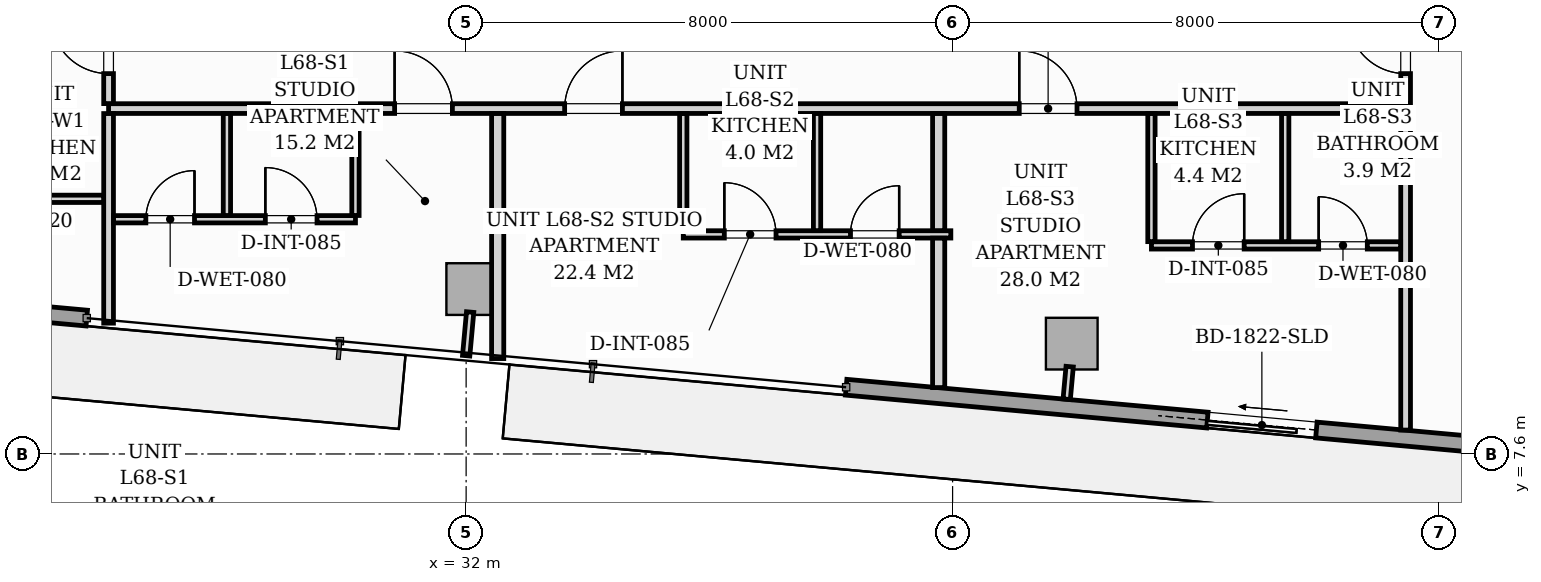
"""IFC4 building model, lengths in metres.
Left out: names, types, materials, properties, quantities, classifications, styles, units other than length and angle.
Written with IfcOpenShell. Run it as: python <this file> out.ifc"""

import sys

from ifc_helpers import new_model, si_unit, direction, frame, frame_2d, origin, origin_2d, place, context, subcontext, project, spatial, rectangle, extrude, source, transform, mapped, element, fill, save


model = new_model("IFC4")
c1 = context("Model", 3, precision=1e-05, world=origin(), true_north=direction((0.0, 1.0)))
c2 = subcontext(c1, "Body", "Model", "MODEL_VIEW")
j1 = project(units=[si_unit("LENGTHUNIT", "METRE"), si_unit("PLANEANGLEUNIT", "RADIAN")], contexts=[c1])
p1 = place(None, origin())
s1 = spatial("IfcSite", under=j1, at=p1, CompositionType="ELEMENT")
p2 = place(p1, origin())
s2 = spatial("IfcBuilding", under=s1, at=p2, CompositionType="ELEMENT")
p3 = place(p2, frame((0.0, 0.0, 236.4)))
s3 = spatial("IfcBuildingStorey", under=s2, at=p3, CompositionType="ELEMENT", Elevation=236.4)
m1 = source(origin(), c2, "Body", "SweptSolid", [
    extrude(rectangle(XDim=0.85, YDim=0.85, at=origin_2d()), origin(), (0.0, 0.0, 1.0), 3.296),
])
for number, where, z_axis, x_axis in (
    (1, (32.1, 10.312, 0.002), (0.0, 0.0, 1.0), (0.996, -0.091, 0.0)),
    (2, (41.96, 9.415, 0.002), (0.0, 0.0, 1.0), (0.996, -0.091, 0.0)),
):
    element("IfcColumn", number, at=place(p3, frame(where, z_axis=z_axis, x_axis=x_axis)), inside=s3, PredefinedType="COLUMN", context=c2, shape_type="MappedRepresentation", body=[
        mapped(m1, transform((0.0, 0.0, 0.0), scale=1.0)),
    ])
p4 = place(p3, frame((52.819, 7.372, 0.0), z_axis=(0.0, 0.0, 1.0), x_axis=(-0.995884447498, 0.090632043071, 0.0)))
e3 = element("IfcWall", 3, at=p4, inside=s3, PredefinedType="STANDARD", context=c2, shape_type="SweptSolid", body=[
    extrude(rectangle(XDim=14.63, YDim=0.26, at=frame_2d((7.315, 0.0))), origin(), (0.0, 0.0, 1.0), 3.04),
])
p5 = place(p4, frame((6.865, 0.0, 0.0)))
e4 = element("IfcOpeningElement", 4, at=p5, cuts=e3, PredefinedType="OPENING", context=c2, shape_type="SweptSolid", body=[
    extrude(rectangle(XDim=1.8, YDim=2.06, at=frame_2d((0.9, 1.03))), frame((0.0, 0.14, 0.0), z_axis=(0.0, -1.0, 0.0), x_axis=(1.0, 0.0, 0.0)), (0.0, 0.0, 1.0), 0.28),
])
p6 = place(p4, frame((2.05, 0.0, 0.65)))
e5 = element("IfcOpeningElement", 5, at=p6, cuts=e3, PredefinedType="OPENING", context=c2, shape_type="SweptSolid", body=[
    extrude(rectangle(XDim=1.6, YDim=1.5, at=frame_2d((0.8, 0.75))), frame((0.0, 0.14, 0.0), z_axis=(0.0, -1.0, 0.0), x_axis=(1.0, 0.0, 0.0)), (0.0, 0.0, 1.0), 0.28),
])
p7 = place(p3, frame((25.761, 9.834, 0.0), z_axis=(0.0, 0.0, 1.0), x_axis=(-0.995884584572, 0.090630536861, 0.0)))
e6 = element("IfcWall", 6, at=p7, inside=s3, PredefinedType="STANDARD", context=c2, shape_type="SweptSolid", body=[
    extrude(rectangle(XDim=14.63, YDim=0.26, at=frame_2d((7.315, 0.0))), origin(), (0.0, 0.0, 1.0), 3.04),
])
p8 = place(p7, frame((4.97, 0.0, 0.0)))
e7 = element("IfcOpeningElement", 7, at=p8, cuts=e6, PredefinedType="OPENING", context=c2, shape_type="SweptSolid", body=[
    extrude(rectangle(XDim=1.8, YDim=2.06, at=frame_2d((0.9, 1.03))), frame((0.0, 0.14, 0.0), z_axis=(0.0, -1.0, 0.0), x_axis=(1.0, 0.0, 0.0)), (0.0, 0.0, 1.0), 0.28),
])
p9 = place(p7, frame((0.7, 0.0, 0.65)))
e8 = element("IfcOpeningElement", 8, at=p9, cuts=e6, PredefinedType="OPENING", context=c2, shape_type="SweptSolid", body=[
    extrude(rectangle(XDim=1.6, YDim=1.5, at=frame_2d((0.8, 0.75))), frame((0.0, 0.14, 0.0), z_axis=(0.0, -1.0, 0.0), x_axis=(1.0, 0.0, 0.0)), (0.0, 0.0, 1.0), 0.28),
])
p10 = place(p3, frame((26.12, 13.28, 0.0), z_axis=(0.0, 0.0, 1.0), x_axis=(1.0, 0.0, 0.0)))
e9 = element("IfcWall", 9, at=p10, inside=s3, PredefinedType="PARTITIONING", context=c2, shape_type="SweptSolid", body=[
    extrude(rectangle(XDim=21.33, YDim=0.16, at=frame_2d((10.665, 0.0))), origin(), (0.0, 0.0, 1.0), 2.597),
])
p11 = place(p10, frame((4.704, 0.0, 0.0)))
e10 = element("IfcOpeningElement", 10, at=p11, cuts=e9, PredefinedType="OPENING", context=c2, shape_type="SweptSolid", body=[
    extrude(rectangle(XDim=0.95, YDim=2.06, at=frame_2d((0.475, 1.03))), frame((0.0, 0.09, 0.0), z_axis=(0.0, -1.0, 0.0), x_axis=(1.0, 0.0, 0.0)), (0.0, 0.0, 1.0), 0.18),
])
p12 = place(p10, frame((7.5, 0.0, 0.0)))
e11 = element("IfcOpeningElement", 11, at=p12, cuts=e9, PredefinedType="OPENING", context=c2, shape_type="SweptSolid", body=[
    extrude(rectangle(XDim=0.95, YDim=2.06, at=frame_2d((0.475, 1.03))), frame((0.0, 0.09, 0.0), z_axis=(0.0, -1.0, 0.0), x_axis=(1.0, 0.0, 0.0)), (0.0, 0.0, 1.0), 0.18),
])
p13 = place(p10, frame((14.976, 0.0, 0.0)))
e12 = element("IfcOpeningElement", 12, at=p13, cuts=e9, PredefinedType="OPENING", context=c2, shape_type="SweptSolid", body=[
    extrude(rectangle(XDim=0.95, YDim=2.06, at=frame_2d((0.475, 1.03))), frame((0.0, 0.09, 0.0), z_axis=(0.0, -1.0, 0.0), x_axis=(1.0, 0.0, 0.0)), (0.0, 0.0, 1.0), 0.18),
])
p14 = place(p3, frame((26.12, 9.751, 0.0), z_axis=(0.0, 0.0, 1.0), x_axis=(0.0, 1.0, 0.0)))
e13 = element("IfcWall", 13, at=p14, inside=s3, PredefinedType="PARTITIONING", context=c2, shape_type="SweptSolid", body=[
    extrude(rectangle(XDim=3.447, YDim=0.16, at=frame_2d((1.723, 0.0))), origin(), (0.0, 0.0, 1.0), 3.04),
])
p15 = place(p3, frame((26.12, 13.362, 0.0), z_axis=(0.0, 0.0, 1.0), x_axis=(0.0, 1.0, 0.0)))
e14 = element("IfcWall", 14, at=p15, inside=s3, PredefinedType="PARTITIONING", context=c2, shape_type="SweptSolid", body=[
    extrude(rectangle(XDim=4.44, YDim=0.16, at=frame_2d((2.22, 0.0))), origin(), (0.0, 0.0, 1.0), 3.04),
])
p16 = place(p15, frame((0.493, 0.0, 0.0)))
e15 = element("IfcOpeningElement", 15, at=p16, cuts=e14, PredefinedType="OPENING", context=c2, shape_type="SweptSolid", body=[
    extrude(rectangle(XDim=0.95, YDim=2.06, at=frame_2d((0.475, 1.03))), frame((0.0, 0.09, 0.0), z_axis=(0.0, -1.0, 0.0), x_axis=(1.0, 0.0, 0.0)), (0.0, 0.0, 1.0), 0.18),
])
p17 = place(p3, frame((47.45, 7.993, 0.0), z_axis=(0.0, 0.0, 1.0), x_axis=(0.0, 1.0, 0.0)))
e16 = element("IfcWall", 16, at=p17, inside=s3, PredefinedType="PARTITIONING", context=c2, shape_type="SweptSolid", body=[
    extrude(rectangle(XDim=5.205, YDim=0.16, at=frame_2d((2.603, 0.0))), origin(), (0.0, 0.0, 1.0), 3.04),
])
p18 = place(p3, frame((47.45, 13.362, 0.0), z_axis=(0.0, 0.0, 1.0), x_axis=(0.0, 1.0, 0.0)))
e17 = element("IfcWall", 17, at=p18, inside=s3, PredefinedType="PARTITIONING", context=c2, shape_type="SweptSolid", body=[
    extrude(rectangle(XDim=7.288, YDim=0.16, at=frame_2d((3.644, 0.0))), origin(), (0.0, 0.0, 1.0), 3.04),
])
p19 = place(p18, frame((0.493, 0.0, 0.0)))
e18 = element("IfcOpeningElement", 18, at=p19, cuts=e17, PredefinedType="OPENING", context=c2, shape_type="SweptSolid", body=[
    extrude(rectangle(XDim=0.95, YDim=2.06, at=frame_2d((0.475, 1.03))), frame((0.0, 0.09, 0.0), z_axis=(0.0, -1.0, 0.0), x_axis=(1.0, 0.0, 0.0)), (0.0, 0.0, 1.0), 0.18),
])
p20 = place(p18, frame((4.783, 0.0, 0.0)))
e19 = element("IfcOpeningElement", 19, at=p20, cuts=e17, PredefinedType="OPENING", context=c2, shape_type="SweptSolid", body=[
    extrude(rectangle(XDim=0.95, YDim=2.06, at=frame_2d((0.475, 1.03))), frame((0.0, 0.09, 0.0), z_axis=(0.0, -1.0, 0.0), x_axis=(1.0, 0.0, 0.0)), (0.0, 0.0, 1.0), 0.18),
])
p21 = place(p3, frame((26.202, 11.46, 0.0), z_axis=(0.0, 0.0, 1.0), x_axis=(1.0, 0.0, 0.0)))
e20 = element("IfcWall", 20, at=p21, inside=s3, PredefinedType="PARTITIONING", context=c2, shape_type="SweptSolid", body=[
    extrude(rectangle(XDim=3.978, YDim=0.12, at=frame_2d((1.989, 0.0))), origin(), (0.0, 0.0, 1.0), 2.597),
])
p22 = place(p21, frame((0.531, 0.0, 0.0)))
e21 = element("IfcOpeningElement", 21, at=p22, cuts=e20, PredefinedType="OPENING", context=c2, shape_type="SweptSolid", body=[
    extrude(rectangle(XDim=0.8, YDim=2.02, at=frame_2d((0.4, 1.01))), frame((0.0, 0.07, 0.0), z_axis=(0.0, -1.0, 0.0), x_axis=(1.0, 0.0, 0.0)), (0.0, 0.0, 1.0), 0.14),
])
p23 = place(p21, frame((2.496, 0.0, 0.0)))
e22 = element("IfcOpeningElement", 22, at=p23, cuts=e20, PredefinedType="OPENING", context=c2, shape_type="SweptSolid", body=[
    extrude(rectangle(XDim=0.85, YDim=2.05, at=frame_2d((0.425, 1.025))), frame((0.0, 0.07, 0.0), z_axis=(0.0, -1.0, 0.0), x_axis=(1.0, 0.0, 0.0)), (0.0, 0.0, 1.0), 0.14),
])
for number, where, z_axis, x_axis in (
    (23, (30.18, 11.522, 0.0), (0.0, 0.0, 1.0), (0.0, 1.0, 0.0)),
    (24, (28.066, 11.522, 0.0), (0.0, 0.0, 1.0), (0.0, 1.0, 0.0)),
):
    element("IfcWall", number, at=place(p3, frame(where, z_axis=z_axis, x_axis=x_axis)), inside=s3, PredefinedType="PARTITIONING", context=c2, shape_type="SweptSolid", body=[
        extrude(rectangle(XDim=1.676, YDim=0.12, at=frame_2d((0.838, 0.0))), origin(), (0.0, 0.0, 1.0), 3.04),
    ])
p24 = place(p3, frame((32.519, 9.169, 0.0), z_axis=(0.0, 0.0, 1.0), x_axis=(0.0, 1.0, 0.0)))
e25 = element("IfcWall", 25, at=p24, inside=s3, PredefinedType="PARTITIONING", context=c2, shape_type="SweptSolid", body=[
    extrude(rectangle(XDim=4.029, YDim=0.2, at=frame_2d((2.014, 0.0))), origin(), (0.0, 0.0, 1.0), 2.4),
])
p25 = place(p3, frame((35.571, 11.211, 0.0), z_axis=(0.0, 0.0, 1.0), x_axis=(1.0, 0.0, 0.0)))
e26 = element("IfcWall", 26, at=p25, inside=s3, PredefinedType="PARTITIONING", context=c2, shape_type="SweptSolid", body=[
    extrude(rectangle(XDim=4.4, YDim=0.12, at=frame_2d((2.2, 0.0))), origin(), (0.0, 0.0, 1.0), 3.04),
])
p26 = place(p25, frame((0.675, 0.0, 0.0)))
e27 = element("IfcOpeningElement", 27, at=p26, cuts=e26, PredefinedType="OPENING", context=c2, shape_type="SweptSolid", body=[
    extrude(rectangle(XDim=0.85, YDim=2.05, at=frame_2d((0.425, 1.025))), frame((0.0, 0.07, 0.0), z_axis=(0.0, -1.0, 0.0), x_axis=(1.0, 0.0, 0.0)), (0.0, 0.0, 1.0), 0.14),
])
p27 = place(p25, frame((2.75, 0.0, 0.0)))
e28 = element("IfcOpeningElement", 28, at=p27, cuts=e26, PredefinedType="OPENING", context=c2, shape_type="SweptSolid", body=[
    extrude(rectangle(XDim=0.8, YDim=2.02, at=frame_2d((0.4, 1.01))), frame((0.0, 0.07, 0.0), z_axis=(0.0, -1.0, 0.0), x_axis=(1.0, 0.0, 0.0)), (0.0, 0.0, 1.0), 0.14),
])
for number, where, z_axis, x_axis in (
    (29, (35.571, 11.273, 0.0), (0.0, 0.0, 1.0), (0.0, 1.0, 0.0)),
    (30, (37.771, 11.273, 0.0), (0.0, 0.0, 1.0), (0.0, 1.0, 0.0)),
):
    element("IfcWall", number, at=place(p3, frame(where, z_axis=z_axis, x_axis=x_axis)), inside=s3, PredefinedType="PARTITIONING", context=c2, shape_type="SweptSolid", body=[
        extrude(rectangle(XDim=1.925, YDim=0.12, at=frame_2d((0.962, 0.0))), origin(), (0.0, 0.0, 1.0), 3.04),
    ])
p28 = place(p3, frame((39.771, 8.692, 0.0), z_axis=(0.0, 0.0, 1.0), x_axis=(0.0, 1.0, 0.0)))
e31 = element("IfcWall", 31, at=p28, inside=s3, PredefinedType="PARTITIONING", context=c2, shape_type="SweptSolid", body=[
    extrude(rectangle(XDim=2.457, YDim=0.2, at=frame_2d((1.229, 0.0))), origin(), (0.0, 0.0, 1.0), 3.04),
])
p29 = place(p3, frame((39.771, 11.273, 0.0), z_axis=(0.0, 0.0, 1.0), x_axis=(0.0, 1.0, 0.0)))
e32 = element("IfcWall", 32, at=p29, inside=s3, PredefinedType="PARTITIONING", context=c2, shape_type="SweptSolid", body=[
    extrude(rectangle(XDim=1.925, YDim=0.2, at=frame_2d((0.962, 0.0))), origin(), (0.0, 0.0, 1.0), 3.04),
])
p30 = place(p3, frame((43.27, 11.03, 0.0), z_axis=(0.0, 0.0, 1.0), x_axis=(1.0, 0.0, 0.0)))
e33 = element("IfcWall", 33, at=p30, inside=s3, PredefinedType="PARTITIONING", context=c2, shape_type="SweptSolid", body=[
    extrude(rectangle(XDim=4.098, YDim=0.12, at=frame_2d((2.049, 0.0))), origin(), (0.0, 0.0, 1.0), 3.04),
])
p31 = place(p30, frame((0.675, 0.0, 0.0)))
e34 = element("IfcOpeningElement", 34, at=p31, cuts=e33, PredefinedType="OPENING", context=c2, shape_type="SweptSolid", body=[
    extrude(rectangle(XDim=0.85, YDim=2.05, at=frame_2d((0.425, 1.025))), frame((0.0, 0.07, 0.0), z_axis=(0.0, -1.0, 0.0), x_axis=(1.0, 0.0, 0.0)), (0.0, 0.0, 1.0), 0.14),
])
p32 = place(p30, frame((2.75, 0.0, 0.0)))
e35 = element("IfcOpeningElement", 35, at=p32, cuts=e33, PredefinedType="OPENING", context=c2, shape_type="SweptSolid", body=[
    extrude(rectangle(XDim=0.8, YDim=2.02, at=frame_2d((0.4, 1.01))), frame((0.0, 0.07, 0.0), z_axis=(0.0, -1.0, 0.0), x_axis=(1.0, 0.0, 0.0)), (0.0, 0.0, 1.0), 0.14),
])
for number, where, z_axis, x_axis in (
    (36, (43.27, 11.092, 0.0), (0.0, 0.0, 1.0), (0.0, 1.0, 0.0)),
    (37, (45.47, 11.092, 0.0), (0.0, 0.0, 1.0), (0.0, 1.0, 0.0)),
):
    element("IfcWall", number, at=place(p3, frame(where, z_axis=z_axis, x_axis=x_axis)), inside=s3, PredefinedType="PARTITIONING", context=c2, shape_type="SweptSolid", body=[
        extrude(rectangle(XDim=2.106, YDim=0.12, at=frame_2d((1.053, 0.0))), origin(), (0.0, 0.0, 1.0), 3.04),
    ])
p33 = place(p3, frame((11.512, 11.796, 0.0), z_axis=(0.0, 0.0, 1.0), x_axis=(1.0, 0.0, 0.0)))
e38 = element("IfcWall", 38, at=p33, inside=s3, PredefinedType="PARTITIONING", context=c2, shape_type="SweptSolid", body=[
    extrude(rectangle(XDim=14.526, YDim=0.12, at=frame_2d((7.263, 0.0))), origin(), (0.0, 0.0, 1.0), 2.483),
])
p34 = place(p33, frame((8.21, 0.0, 0.0)))
e39 = element("IfcOpeningElement", 39, at=p34, cuts=e38, PredefinedType="OPENING", context=c2, shape_type="SweptSolid", body=[
    extrude(rectangle(XDim=0.85, YDim=2.05, at=frame_2d((0.425, 1.025))), frame((0.0, 0.07, 0.0), z_axis=(0.0, -1.0, 0.0), x_axis=(1.0, 0.0, 0.0)), (0.0, 0.0, 1.0), 0.14),
])
p35 = place(p3, frame((32.066, 9.933, 0.0), z_axis=(0.0, 0.0, 1.0), x_axis=(-0.090872036342, -0.995862577373, 0.0)))
e40 = element("IfcWall", 40, at=p35, inside=s3, PredefinedType="PARTITIONING", context=c2, shape_type="SweptSolid", body=[
    extrude(rectangle(XDim=0.72, YDim=0.12, at=frame_2d((0.36, 0.0))), origin(), (0.0, 0.0, 1.0), 3.04),
])
p36 = place(p3, frame((41.925, 9.036, 0.0), z_axis=(0.0, 0.0, 1.0), x_axis=(-0.090740281653, -0.995874591144, 0.0)))
e41 = element("IfcWall", 41, at=p36, inside=s3, PredefinedType="PARTITIONING", context=c2, shape_type="SweptSolid", body=[
    extrude(rectangle(XDim=0.538, YDim=0.12, at=frame_2d((0.269, 0.0))), origin(), (0.0, 0.0, 1.0), 3.04),
])
m2 = source(origin(), c2, "Body", "SweptSolid", [
    extrude(rectangle(XDim=1.8, YDim=2.06, at=frame_2d((0.9, 1.03))), frame((0.0, 0.025, 0.0), z_axis=(0.0, -1.0, 0.0), x_axis=(1.0, 0.0, 0.0)), (0.0, 0.0, 1.0), 0.05),
])
p37 = place(p5, origin())
e42 = element("IfcDoor", 42, at=p37, inside=s3, OperationType="SLIDING_TO_RIGHT", PredefinedType="DOOR", context=c2, shape_type="MappedRepresentation", body=[
    mapped(m2, transform((0.0, 0.0, 0.0), scale=1.0)),
])
fill(e4, e42)
m3 = source(origin(), c2, "Body", "SweptSolid", [
    extrude(rectangle(XDim=0.95, YDim=2.06, at=frame_2d((0.475, 1.03))), frame((0.0, 0.025, 0.0), z_axis=(0.0, -1.0, 0.0), x_axis=(1.0, 0.0, 0.0)), (0.0, 0.0, 1.0), 0.05),
])
p38 = place(p11, origin())
e43 = element("IfcDoor", 43, at=p38, inside=s3, OperationType="SINGLE_SWING_LEFT", PredefinedType="DOOR", context=c2, shape_type="MappedRepresentation", body=[
    mapped(m3, transform((0.0, 0.0, 0.0), scale=1.0)),
])
fill(e10, e43)
m4 = source(origin(), c2, "Body", "SweptSolid", [
    extrude(rectangle(XDim=0.8, YDim=2.02, at=frame_2d((0.4, 1.01))), frame((0.0, 0.025, 0.0), z_axis=(0.0, -1.0, 0.0), x_axis=(1.0, 0.0, 0.0)), (0.0, 0.0, 1.0), 0.05),
])
p39 = place(p22, origin())
e44 = element("IfcDoor", 44, at=p39, inside=s3, OperationType="SINGLE_SWING_RIGHT", PredefinedType="DOOR", context=c2, shape_type="MappedRepresentation", body=[
    mapped(m4, transform((0.0, 0.0, 0.0), scale=1.0)),
])
fill(e21, e44)
m5 = source(origin(), c2, "Body", "SweptSolid", [
    extrude(rectangle(XDim=0.85, YDim=2.05, at=frame_2d((0.425, 1.025))), frame((0.0, 0.025, 0.0), z_axis=(0.0, -1.0, 0.0), x_axis=(1.0, 0.0, 0.0)), (0.0, 0.0, 1.0), 0.05),
])
p40 = place(p23, origin())
e45 = element("IfcDoor", 45, at=p40, inside=s3, OperationType="SINGLE_SWING_LEFT", PredefinedType="DOOR", context=c2, shape_type="MappedRepresentation", body=[
    mapped(m5, transform((0.0, 0.0, 0.0), scale=1.0)),
])
fill(e22, e45)
p41 = place(p12, origin())
e46 = element("IfcDoor", 46, at=p41, inside=s3, OperationType="SINGLE_SWING_RIGHT", PredefinedType="DOOR", context=c2, shape_type="MappedRepresentation", body=[
    mapped(m3, transform((0.0, 0.0, 0.0), scale=1.0)),
])
fill(e11, e46)
p42 = place(p26, origin())
e47 = element("IfcDoor", 47, at=p42, inside=s3, OperationType="SINGLE_SWING_LEFT", PredefinedType="DOOR", context=c2, shape_type="MappedRepresentation", body=[
    mapped(m5, transform((0.0, 0.0, 0.0), scale=1.0)),
])
fill(e27, e47)
p43 = place(p27, origin())
e48 = element("IfcDoor", 48, at=p43, inside=s3, OperationType="SINGLE_SWING_RIGHT", PredefinedType="DOOR", context=c2, shape_type="MappedRepresentation", body=[
    mapped(m4, transform((0.0, 0.0, 0.0), scale=1.0)),
])
fill(e28, e48)
p44 = place(p13, origin())
e49 = element("IfcDoor", 49, at=p44, inside=s3, OperationType="SINGLE_SWING_LEFT", PredefinedType="DOOR", context=c2, shape_type="MappedRepresentation", body=[
    mapped(m3, transform((0.0, 0.0, 0.0), scale=1.0)),
])
fill(e12, e49)
p45 = place(p31, origin())
e50 = element("IfcDoor", 50, at=p45, inside=s3, OperationType="SINGLE_SWING_RIGHT", PredefinedType="DOOR", context=c2, shape_type="MappedRepresentation", body=[
    mapped(m5, transform((0.0, 0.0, 0.0), scale=1.0)),
])
fill(e34, e50)
p46 = place(p32, origin())
e51 = element("IfcDoor", 51, at=p46, inside=s3, OperationType="SINGLE_SWING_LEFT", PredefinedType="DOOR", context=c2, shape_type="MappedRepresentation", body=[
    mapped(m4, transform((0.0, 0.0, 0.0), scale=1.0)),
])
fill(e35, e51)
p47 = place(p16, origin())
e52 = element("IfcDoor", 52, at=p47, inside=s3, OperationType="SINGLE_SWING_RIGHT", PredefinedType="DOOR", context=c2, shape_type="MappedRepresentation", body=[
    mapped(m3, transform((0.0, 0.0, 0.0), scale=1.0)),
])
fill(e15, e52)
p48 = place(p19, origin())
e53 = element("IfcDoor", 53, at=p48, inside=s3, OperationType="SINGLE_SWING_RIGHT", PredefinedType="DOOR", context=c2, shape_type="MappedRepresentation", body=[
    mapped(m3, transform((0.0, 0.0, 0.0), scale=1.0)),
])
fill(e18, e53)
save(model, sys.argv[1])
